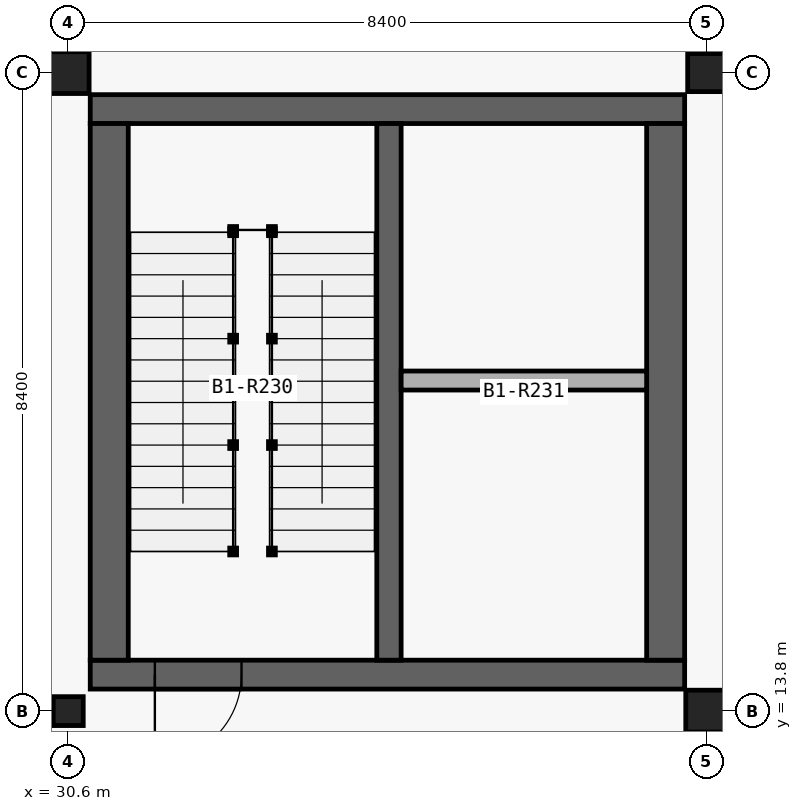
"""IFC4 building model, lengths in metres.
Left out: names, types, materials, properties, quantities, classifications, styles, units other than length and angle.
Written with IfcOpenShell. Run it as: python <this file> out.ifc"""

import sys

from ifc_helpers import new_model, si_unit, direction, frame, frame_2d, origin_with_axes, origin_2d_with_axis, place, context, subcontext, project, spatial, rectangle, i_section, extrude, element, fill, save


model = new_model("IFC4")
c1 = context("Model", 3, precision=1e-05, world=origin_with_axes(), true_north=direction((0.0, 1.0)))
c2 = subcontext(c1, "Body", "Model", "MODEL_VIEW")
j1 = project(units=[si_unit("LENGTHUNIT", "METRE"), si_unit("PLANEANGLEUNIT", "RADIAN")], contexts=[c1])
p1 = place(None, origin_with_axes())
s1 = spatial("IfcSite", under=j1, at=p1, CompositionType="ELEMENT")
p2 = place(p1, origin_with_axes())
s2 = spatial("IfcBuilding", under=s1, at=p2, CompositionType="ELEMENT")
p3 = place(p2, frame((0.0, 0.0, -4.8), z_axis=(0.0, 0.0, 1.0), x_axis=(1.0, 0.0, 0.0)))
s3 = spatial("IfcBuildingStorey", under=s2, at=p3, CompositionType="ELEMENT", Elevation=-4.8)
p4 = place(None, frame((30.89, 14.28, -5.35), z_axis=(0.0, 0.0, 1.0), x_axis=(1.0, 0.0, 0.0)))
e1 = element("IfcWall", 1, at=p4, inside=s3, PredefinedType="SHEAR", context=c2, shape_type="SweptSolid", body=[
    extrude(rectangle(XDim=7.82, YDim=0.38, at=frame_2d((3.91, 0.0), x_axis=(1.0, 0.0))), origin_with_axes(), (0.0, 0.0, 1.0), 5.35),
])
p5 = place(None, frame((32.31, 14.28, -4.8), z_axis=(0.0, 0.0, 1.0), x_axis=(1.0, 0.0, 0.0)))
e2 = element("IfcOpeningElement", 2, at=p5, cuts=e1, PredefinedType="OPENING", context=c2, shape_type="SweptSolid", body=[
    extrude(rectangle(XDim=1.14, YDim=2.18, at=frame_2d((0.0, 1.09), x_axis=(1.0, 0.0))), frame((0.0, 0.2, 0.0), z_axis=(0.0, -1.0, 0.0), x_axis=(1.0, 0.0, 0.0)), (0.0, 0.0, 1.0), 0.4),
])
p6 = place(None, frame((38.71, 21.72, -5.35), z_axis=(0.0, 0.0, 1.0), x_axis=(-1.0, 0.0, 0.0)))
e3 = element("IfcWall", 3, at=p6, inside=s3, PredefinedType="SHEAR", context=c2, shape_type="SweptSolid", body=[
    extrude(rectangle(XDim=7.82, YDim=0.38, at=frame_2d((3.91, 0.0), x_axis=(1.0, 0.0))), origin_with_axes(), (0.0, 0.0, 1.0), 5.35),
])
for number, where, z_axis, x_axis in (
    (4, (38.46, 14.47, -5.35), (0.0, 0.0, 1.0), (0.0, 1.0, 0.0)),
    (5, (31.14, 21.53, -5.35), (0.0, 0.0, 1.0), (0.0, -1.0, 0.0)),
):
    element("IfcWall", number, at=place(None, frame(where, z_axis=z_axis, x_axis=x_axis)), inside=s3, PredefinedType="SHEAR", context=c2, shape_type="SweptSolid", body=[
        extrude(rectangle(XDim=7.06, YDim=0.5, at=frame_2d((3.53, 0.0), x_axis=(1.0, 0.0))), origin_with_axes(), (0.0, 0.0, 1.0), 5.35),
    ])
p7 = place(None, frame((34.82, 14.47, -5.35), z_axis=(0.0, 0.0, 1.0), x_axis=(0.0, 1.0, 0.0)))
e6 = element("IfcWall", 6, at=p7, inside=s3, PredefinedType="SHEAR", context=c2, shape_type="SweptSolid", body=[
    extrude(rectangle(XDim=7.06, YDim=0.32, at=frame_2d((3.53, 0.0), x_axis=(1.0, 0.0))), origin_with_axes(), (0.0, 0.0, 1.0), 5.35),
])
p8 = place(None, frame((34.98, 18.149, -4.8), z_axis=(0.0, 0.0, 1.0), x_axis=(1.0, 0.0, 0.0)))
e7 = element("IfcWall", 7, at=p8, inside=s3, PredefinedType="PARTITIONING", context=c2, shape_type="SweptSolid", body=[
    extrude(rectangle(XDim=3.23, YDim=0.25, at=frame_2d((1.615, 0.0), x_axis=(1.0, 0.0))), origin_with_axes(), (0.0, 0.0, 1.0), 4.44),
])
p9 = place(None, frame((30.6, 13.8, -5.35), z_axis=(0.0, 0.0, 1.0), x_axis=(1.0, 0.0, 0.0)))
e8 = element("IfcColumn", 8, at=p9, inside=s3, PredefinedType="COLUMN", context=c2, shape_type="SweptSolid", body=[
    extrude(i_section(OverallWidth=0.395, OverallDepth=0.38, WebThickness=0.019, FlangeThickness=0.03, at=origin_2d_with_axis()), origin_with_axes(), (0.0, 0.0, 1.0), 5.35),
])
for number, where, z_axis, x_axis in (
    (9, (30.6, 22.2, -5.35), (0.0, 0.0, 1.0), (1.0, 0.0, 0.0)),
    (10, (39.0, 13.8, -5.35), (0.0, 0.0, 1.0), (1.0, 0.0, 0.0)),
):
    element("IfcColumn", number, at=place(None, frame(where, z_axis=z_axis, x_axis=x_axis)), inside=s3, PredefinedType="COLUMN", context=c2, shape_type="SweptSolid", body=[
        extrude(i_section(OverallWidth=0.55, OverallDepth=0.55, WebThickness=0.025, FlangeThickness=0.042, at=origin_2d_with_axis()), origin_with_axes(), (0.0, 0.0, 1.0), 5.35),
    ])
p10 = place(None, frame((39.0, 22.2, -5.35), z_axis=(0.0, 0.0, 1.0), x_axis=(1.0, 0.0, 0.0)))
e11 = element("IfcColumn", 11, at=p10, inside=s3, PredefinedType="COLUMN", context=c2, shape_type="SweptSolid", body=[
    extrude(i_section(OverallWidth=0.5, OverallDepth=0.5, WebThickness=0.022, FlangeThickness=0.036, at=origin_2d_with_axis()), origin_with_axes(), (0.0, 0.0, 1.0), 5.35),
])
p11 = place(None, frame((32.31, 14.28, -4.8), z_axis=(0.0, 0.0, 1.0), x_axis=(-1.0, 0.0, 0.0)))
e12 = element("IfcDoor", 12, at=p11, inside=s3, OperationType="SINGLE_SWING_LEFT", PredefinedType="DOOR", context=c2, shape_type="SweptSolid", body=[
    extrude(rectangle(XDim=1.14, YDim=2.18, at=frame_2d((0.0, 1.09), x_axis=(1.0, 0.0))), frame((0.0, 0.04, 0.0), z_axis=(0.0, -1.0, 0.0), x_axis=(1.0, 0.0, 0.0)), (0.0, 0.0, 1.0), 0.08),
])
fill(e2, e12)
save(model, sys.argv[1])
